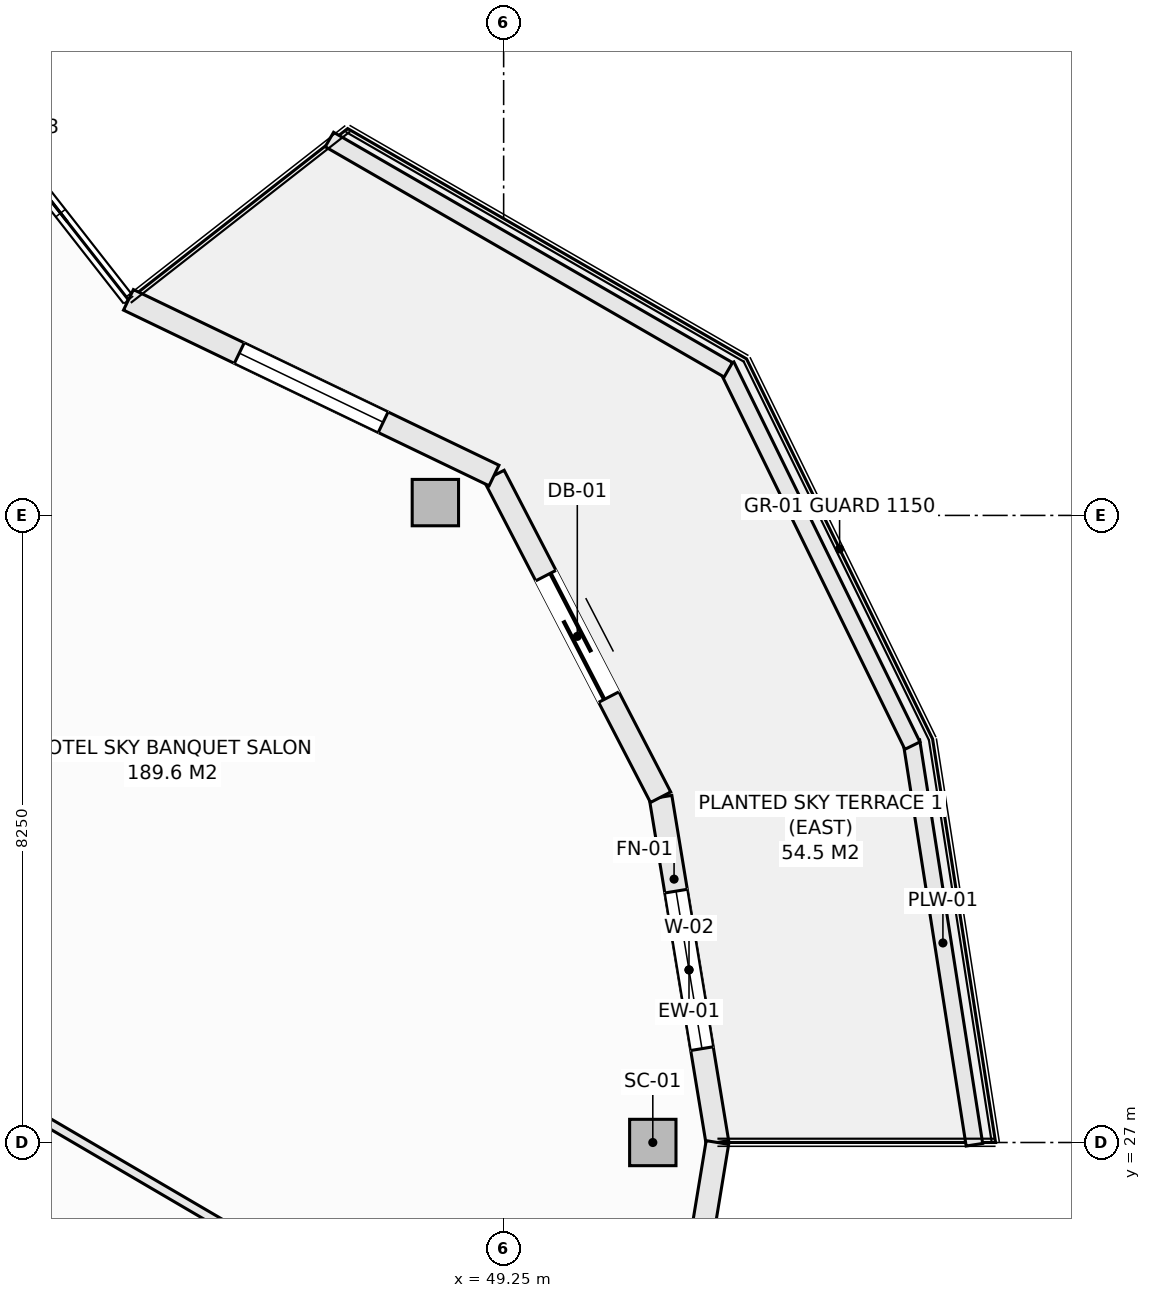
"""IFC4 building model, lengths in metres.
Left out: names, types, materials, properties, quantities, classifications, styles, units other than length and angle.
Written with IfcOpenShell. Run it as: python <this file> out.ifc"""

import sys

from ifc_helpers import new_model, si_unit, direction, frame, frame_2d, origin, origin_2d, place, context, subcontext, project, spatial, rectangle, hollow_rectangle, extrude, element, fill, save


model = new_model("IFC4")
c1 = context("Model", 3, precision=1e-05, world=origin(), true_north=direction((0.0, 1.0)))
c2 = subcontext(c1, "Body", "Model", "MODEL_VIEW")
j1 = project(units=[si_unit("LENGTHUNIT", "METRE"), si_unit("PLANEANGLEUNIT", "RADIAN")], contexts=[c1])
p1 = place(None, origin())
s1 = spatial("IfcSite", under=j1, at=p1, CompositionType="ELEMENT")
p2 = place(p1, origin())
s2 = spatial("IfcBuilding", under=s1, at=p2, CompositionType="ELEMENT")
p3 = place(p2, frame((0.0, 0.0, 142.7)))
s3 = spatial("IfcBuildingStorey", under=s2, at=p3, CompositionType="ELEMENT", Elevation=142.7)
for number, where, z_axis, x_axis in (
    (1, (51.212, 27.0, -0.27), (0.0, 0.0, 1.0), (1.0, 0.0, 0.0)),
    (2, (48.352, 35.419, -0.27), (0.0, 0.0, 1.0), (1.0, 0.0, 0.0)),
):
    element("IfcColumn", number, at=place(p3, frame(where, z_axis=z_axis, x_axis=x_axis)), inside=s3, PredefinedType="COLUMN", context=c2, shape_type="SweptSolid", body=[
        extrude(hollow_rectangle(XDim=0.61, YDim=0.61, WallThickness=0.025, at=origin_2d()), origin(), (0.0, 0.0, 1.0), 3.4),
    ])
p4 = place(p3, frame((51.315, 31.542, 0.0), z_axis=(0.0, 0.0, 1.0), x_axis=(0.162394765401, -0.986725868806, 0.0)))
e3 = element("IfcWall", 3, at=p4, inside=s3, PredefinedType="SOLIDWALL", context=c2, shape_type="SweptSolid", body=[
    extrude(rectangle(XDim=4.603, YDim=0.3, at=frame_2d((2.302, 0.0))), origin(), (0.0, 0.0, 1.0), 2.653),
])
p5 = place(p4, frame((1.252, 0.0, 0.74)))
e4 = element("IfcOpeningElement", 4, at=p5, cuts=e3, PredefinedType="OPENING", context=c2, shape_type="SweptSolid", body=[
    extrude(rectangle(XDim=2.1, YDim=1.7, at=frame_2d((1.05, 0.85))), frame((0.0, 0.16, 0.0), z_axis=(0.0, -1.0, 0.0), x_axis=(1.0, 0.0, 0.0)), (0.0, 0.0, 1.0), 0.32),
])
p6 = place(p3, frame((49.123, 35.775, 0.0), z_axis=(0.0, 0.0, 1.0), x_axis=(0.459810251451, -0.888017191647, 0.0)))
e5 = element("IfcWall", 5, at=p6, inside=s3, PredefinedType="SOLIDWALL", context=c2, shape_type="SweptSolid", body=[
    extrude(rectangle(XDim=4.766, YDim=0.3, at=frame_2d((2.383, 0.0))), origin(), (0.0, 0.0, 1.0), 2.653),
])
p7 = place(p6, frame((1.483, 0.0, 0.0)))
e6 = element("IfcOpeningElement", 6, at=p7, cuts=e5, PredefinedType="OPENING", context=c2, shape_type="SweptSolid", body=[
    extrude(rectangle(XDim=1.8, YDim=2.25, at=frame_2d((0.9, 1.125))), frame((0.0, 0.16, 0.0), z_axis=(0.0, -1.0, 0.0), x_axis=(1.0, 0.0, 0.0)), (0.0, 0.0, 1.0), 0.32),
])
p8 = place(p3, frame((44.313, 38.086, 0.0), z_axis=(0.0, 0.0, 1.0), x_axis=(0.901353070301, -0.433085029363, 0.0)))
e7 = element("IfcWall", 7, at=p8, inside=s3, PredefinedType="SOLIDWALL", context=c2, shape_type="SweptSolid", body=[
    extrude(rectangle(XDim=5.336, YDim=0.3, at=frame_2d((2.668, 0.0))), origin(), (0.0, 0.0, 1.0), 2.653),
])
p9 = place(p8, frame((1.618, 0.0, 0.74)))
e8 = element("IfcOpeningElement", 8, at=p9, cuts=e7, PredefinedType="OPENING", context=c2, shape_type="SweptSolid", body=[
    extrude(rectangle(XDim=2.1, YDim=1.7, at=frame_2d((1.05, 0.85))), frame((0.0, 0.16, 0.0), z_axis=(0.0, -1.0, 0.0), x_axis=(1.0, 0.0, 0.0)), (0.0, 0.0, 1.0), 0.32),
])
p10 = place(p3, frame((51.315, 22.458, 0.0), z_axis=(0.0, 0.0, 1.0), x_axis=(0.162394765401, 0.986725868806, 0.0)))
e9 = element("IfcWall", 9, at=p10, inside=s3, PredefinedType="SOLIDWALL", context=c2, shape_type="SweptSolid", body=[
    extrude(rectangle(XDim=4.603, YDim=0.3, at=frame_2d((2.302, 0.0))), origin(), (0.0, 0.0, 1.0), 2.653),
])
p11 = place(p10, frame((1.252, 0.0, 0.74)))
e10 = element("IfcOpeningElement", 10, at=p11, cuts=e9, PredefinedType="OPENING", context=c2, shape_type="SweptSolid", body=[
    extrude(rectangle(XDim=2.1, YDim=1.7, at=frame_2d((1.05, 0.85))), frame((0.0, 0.16, 0.0), z_axis=(0.0, -1.0, 0.0), x_axis=(1.0, 0.0, 0.0)), (0.0, 0.0, 1.0), 0.32),
])
p12 = place(p3, frame((54.615, 32.28, 0.0), z_axis=(0.0, 0.0, 1.0), x_axis=(0.154245214003, -0.988032597619, 0.0)))
e11 = element("IfcWall", 11, at=p12, inside=s3, PredefinedType="PARAPET", context=c2, shape_type="SweptSolid", body=[
    extrude(rectangle(XDim=5.374, YDim=0.22, at=frame_2d((2.687, 0.0))), origin(), (0.0, 0.0, 1.0), 0.52),
])
p13 = place(p3, frame((52.18, 37.221, 0.0), z_axis=(0.0, 0.0, 1.0), x_axis=(0.439637174641, -0.898175458735, 0.0)))
e12 = element("IfcWall", 12, at=p13, inside=s3, PredefinedType="PARAPET", context=c2, shape_type="SweptSolid", body=[
    extrude(rectangle(XDim=5.567, YDim=0.22, at=frame_2d((2.784, 0.0))), origin(), (0.0, 0.0, 1.0), 0.52),
])
p14 = place(p3, frame((46.958, 40.195, 0.0), z_axis=(0.0, 0.0, 1.0), x_axis=(0.866058128659, -0.499943314571, 0.0)))
e13 = element("IfcWall", 13, at=p14, inside=s3, PredefinedType="PARAPET", context=c2, shape_type="SweptSolid", body=[
    extrude(rectangle(XDim=6.06, YDim=0.22, at=frame_2d((3.03, 0.0))), origin(), (0.0, 0.0, 1.0), 0.52),
])
p15 = place(p3, frame((38.962, 29.777, 0.0), z_axis=(0.0, 0.0, 1.0), x_axis=(0.862952708635, -0.505284694662, 0.0)))
e14 = element("IfcWall", 14, at=p15, inside=s3, PredefinedType="PARTITIONING", context=c2, shape_type="SweptSolid", body=[
    extrude(rectangle(XDim=14.167, YDim=0.12, at=frame_2d((7.083, 0.0))), origin(), (0.0, 0.0, 1.0), 2.505),
])
p16 = place(p5, origin())
e15 = element("IfcWindow", 15, at=p16, inside=s3, PartitioningType="SINGLE_PANEL", PredefinedType="WINDOW", context=c2, shape_type="SweptSolid", body=[
    extrude(rectangle(XDim=2.1, YDim=1.7, at=frame_2d((1.05, 0.85))), frame((0.0, 0.03, 0.0), z_axis=(0.0, -1.0, 0.0), x_axis=(1.0, 0.0, 0.0)), (0.0, 0.0, 1.0), 0.06),
])
fill(e4, e15)
p17 = place(p7, origin())
e16 = element("IfcDoor", 16, at=p17, inside=s3, OperationType="SLIDING_TO_LEFT", PredefinedType="DOOR", context=c2, shape_type="SweptSolid", body=[
    extrude(rectangle(XDim=1.8, YDim=2.25, at=frame_2d((0.9, 1.125))), frame((0.0, 0.025, 0.0), z_axis=(0.0, -1.0, 0.0), x_axis=(1.0, 0.0, 0.0)), (0.0, 0.0, 1.0), 0.05),
])
fill(e6, e16)
p18 = place(p9, origin())
e17 = element("IfcWindow", 17, at=p18, inside=s3, PartitioningType="SINGLE_PANEL", PredefinedType="WINDOW", context=c2, shape_type="SweptSolid", body=[
    extrude(rectangle(XDim=2.1, YDim=1.7, at=frame_2d((1.05, 0.85))), frame((0.0, 0.03, 0.0), z_axis=(0.0, -1.0, 0.0), x_axis=(1.0, 0.0, 0.0)), (0.0, 0.0, 1.0), 0.06),
])
fill(e8, e17)
save(model, sys.argv[1])
